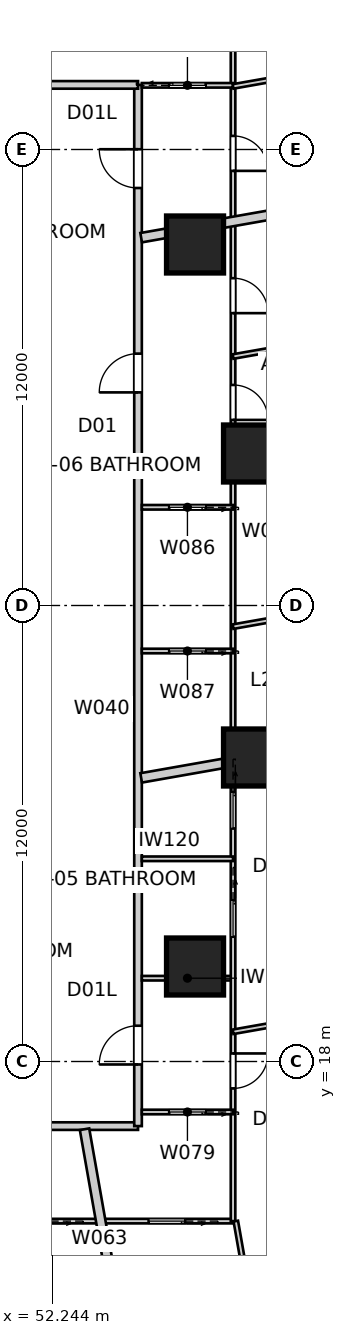
"""IFC4 building model, lengths in metres.
Left out: names, types, materials, properties, quantities, classifications, styles, units other than length and angle.
Written with IfcOpenShell. Run it as: python <this file> out.ifc"""

import sys

from ifc_helpers import new_model, si_unit, direction, frame, frame_2d, origin, origin_2d, place, context, subcontext, project, spatial, rectangle, extrude, element, fill, save


model = new_model("IFC4")
c1 = context("Model", 3, precision=1e-05, world=origin(), true_north=direction((0.0, 1.0)))
c2 = subcontext(c1, "Body", "Model", "MODEL_VIEW")
j1 = project(units=[si_unit("LENGTHUNIT", "METRE"), si_unit("PLANEANGLEUNIT", "RADIAN")], contexts=[c1])
p1 = place(None, origin())
s1 = spatial("IfcSite", under=j1, at=p1, CompositionType="ELEMENT")
p2 = place(p1, origin())
s2 = spatial("IfcBuilding", under=s1, at=p2, CompositionType="ELEMENT")
p3 = place(p2, frame((0.0, 0.0, 93.0)))
s3 = spatial("IfcBuildingStorey", under=s2, at=p3, CompositionType="ELEMENT", Elevation=93.0)
for number, where, z_axis, x_axis in (
    (1, (57.5, 26.0, 0.0), (0.0, 0.0, 1.0), (1.0, 0.0, 0.0)),
    (2, (57.5, 34.0, 0.0), (0.0, 0.0, 1.0), (1.0, 0.0, 0.0)),
    (3, (56.0, 39.5, 0.0), (0.0, 0.0, 1.0), (1.0, 0.0, 0.0)),
    (4, (56.0, 20.5, 0.0), (0.0, 0.0, 1.0), (1.0, 0.0, 0.0)),
):
    element("IfcColumn", number, at=place(p3, frame(where, z_axis=z_axis, x_axis=x_axis)), inside=s3, PredefinedType="COLUMN", context=c2, shape_type="SweptSolid", body=[
        extrude(rectangle(XDim=1.5, YDim=1.5, at=origin_2d()), origin(), (0.0, 0.0, 1.0), 3.4),
    ])
p4 = place(p3, frame((25.5, 16.3, 0.0), z_axis=(0.0, 0.0, 1.0), x_axis=(1.0, 0.0, 0.0)))
e5 = element("IfcWall", 5, at=p4, inside=s3, PredefinedType="PARTITIONING", context=c2, shape_type="SweptSolid", body=[
    extrude(rectangle(XDim=29.0, YDim=0.2, at=frame_2d((14.5, 0.0))), origin(), (0.0, 0.0, 1.0), 3.25),
])
p5 = place(p4, frame((20.896, 0.0, 0.0)))
e6 = element("IfcOpeningElement", 6, at=p5, cuts=e5, PredefinedType="OPENING", context=c2, shape_type="SweptSolid", body=[
    extrude(rectangle(XDim=1.02, YDim=2.34, at=frame_2d((0.51, 1.17))), frame((0.0, 0.11, 0.0), z_axis=(0.0, -1.0, 0.0), x_axis=(1.0, 0.0, 0.0)), (0.0, 0.0, 1.0), 0.22),
])
p6 = place(p4, frame((14.257, 0.0, 0.0)))
e7 = element("IfcOpeningElement", 7, at=p6, cuts=e5, PredefinedType="OPENING", context=c2, shape_type="SweptSolid", body=[
    extrude(rectangle(XDim=1.02, YDim=2.34, at=frame_2d((0.51, 1.17))), frame((0.0, 0.11, 0.0), z_axis=(0.0, -1.0, 0.0), x_axis=(1.0, 0.0, 0.0)), (0.0, 0.0, 1.0), 0.22),
])
p7 = place(p4, frame((3.857, 0.0, 0.0)))
e8 = element("IfcOpeningElement", 8, at=p7, cuts=e5, PredefinedType="OPENING", context=c2, shape_type="SweptSolid", body=[
    extrude(rectangle(XDim=1.02, YDim=2.34, at=frame_2d((0.51, 1.17))), frame((0.0, 0.11, 0.0), z_axis=(0.0, -1.0, 0.0), x_axis=(1.0, 0.0, 0.0)), (0.0, 0.0, 1.0), 0.22),
])
p8 = place(p3, frame((54.5, 16.3, 0.0), z_axis=(0.0, 0.0, 1.0), x_axis=(0.0, 1.0, 0.0)))
e9 = element("IfcWall", 9, at=p8, inside=s3, PredefinedType="PARTITIONING", context=c2, shape_type="SweptSolid", body=[
    extrude(rectangle(XDim=27.4, YDim=0.2, at=frame_2d((13.7, 0.0))), origin(), (0.0, 0.0, 1.0), 3.25),
])
p9 = place(p8, frame((19.308, 0.0, 0.0)))
e10 = element("IfcOpeningElement", 10, at=p9, cuts=e9, PredefinedType="OPENING", context=c2, shape_type="SweptSolid", body=[
    extrude(rectangle(XDim=1.02, YDim=2.34, at=frame_2d((0.51, 1.17))), frame((0.0, 0.11, 0.0), z_axis=(0.0, -1.0, 0.0), x_axis=(1.0, 0.0, 0.0)), (0.0, 0.0, 1.0), 0.22),
])
p10 = place(p8, frame((24.687, 0.0, 0.0)))
e11 = element("IfcOpeningElement", 11, at=p10, cuts=e9, PredefinedType="OPENING", context=c2, shape_type="SweptSolid", body=[
    extrude(rectangle(XDim=1.02, YDim=2.1, at=frame_2d((0.51, 1.05))), frame((0.0, 0.11, 0.0), z_axis=(0.0, -1.0, 0.0), x_axis=(1.0, 0.0, 0.0)), (0.0, 0.0, 1.0), 0.22),
])
p11 = place(p8, frame((1.622, 0.0, 0.0)))
e12 = element("IfcOpeningElement", 12, at=p11, cuts=e9, PredefinedType="OPENING", context=c2, shape_type="SweptSolid", body=[
    extrude(rectangle(XDim=1.02, YDim=2.1, at=frame_2d((0.51, 1.05))), frame((0.0, 0.11, 0.0), z_axis=(0.0, -1.0, 0.0), x_axis=(1.0, 0.0, 0.0)), (0.0, 0.0, 1.0), 0.22),
])
p12 = place(p3, frame((54.5, 43.7, 0.0), z_axis=(0.0, 0.0, 1.0), x_axis=(-1.0, 0.0, 0.0)))
e13 = element("IfcWall", 13, at=p12, inside=s3, PredefinedType="PARTITIONING", context=c2, shape_type="SweptSolid", body=[
    extrude(rectangle(XDim=29.0, YDim=0.2, at=frame_2d((14.5, 0.0))), origin(), (0.0, 0.0, 1.0), 3.25),
])
p13 = place(p12, frame((11.951, 0.0, 0.0)))
e14 = element("IfcOpeningElement", 14, at=p13, cuts=e13, PredefinedType="OPENING", context=c2, shape_type="SweptSolid", body=[
    extrude(rectangle(XDim=1.02, YDim=2.34, at=frame_2d((0.51, 1.17))), frame((0.0, 0.11, 0.0), z_axis=(0.0, -1.0, 0.0), x_axis=(1.0, 0.0, 0.0)), (0.0, 0.0, 1.0), 0.22),
])
p14 = place(p12, frame((4.795, 0.0, 0.0)))
e15 = element("IfcOpeningElement", 15, at=p14, cuts=e13, PredefinedType="OPENING", context=c2, shape_type="SweptSolid", body=[
    extrude(rectangle(XDim=1.02, YDim=2.34, at=frame_2d((0.51, 1.17))), frame((0.0, 0.11, 0.0), z_axis=(0.0, -1.0, 0.0), x_axis=(1.0, 0.0, 0.0)), (0.0, 0.0, 1.0), 0.22),
])
p15 = place(p3, frame((63.405, 41.235, 0.0), z_axis=(0.0, 0.0, 1.0), x_axis=(-0.984806596137, -0.173654738504, 0.0)))
e16 = element("IfcWall", 16, at=p15, inside=s3, PredefinedType="PARTITIONING", context=c2, shape_type="SweptSolid", body=[
    extrude(rectangle(XDim=8.958, YDim=0.25, at=frame_2d((4.479, 0.0))), origin(), (0.0, 0.0, 1.0), 3.25),
])
p16 = place(p3, frame((65.836, 27.448, 0.0), z_axis=(0.0, 0.0, 1.0), x_axis=(-0.98481000304, -0.173635416642, 0.0)))
e17 = element("IfcWall", 17, at=p16, inside=s3, PredefinedType="PARTITIONING", context=c2, shape_type="SweptSolid", body=[
    extrude(rectangle(XDim=11.427, YDim=0.25, at=frame_2d((5.713, 0.0))), origin(), (0.0, 0.0, 1.0), 3.25),
])
p17 = place(p3, frame((54.682, 7.203, 0.0), z_axis=(0.0, 0.0, 1.0), x_axis=(-0.173630137029, 0.984810933893, 0.0)))
e18 = element("IfcWall", 18, at=p17, inside=s3, PredefinedType="PARTITIONING", context=c2, shape_type="SweptSolid", body=[
    extrude(rectangle(XDim=9.154, YDim=0.25, at=frame_2d((4.577, 0.0))), origin(), (0.0, 0.0, 1.0), 3.25),
])
p18 = place(p3, frame((57.0, 13.8, 0.0), z_axis=(0.0, 0.0, 1.0), x_axis=(-1.0, 0.0, 0.0)))
e19 = element("IfcWall", 19, at=p18, inside=s3, PredefinedType="PARTITIONING", context=c2, shape_type="SweptSolid", body=[
    extrude(rectangle(XDim=34.0, YDim=0.12, at=frame_2d((17.0, 0.0))), origin(), (0.0, 0.0, 1.0), 2.55),
])
p19 = place(p18, frame((8.768, 0.0, 0.0)))
e20 = element("IfcOpeningElement", 20, at=p19, cuts=e19, PredefinedType="OPENING", context=c2, shape_type="SweptSolid", body=[
    extrude(rectangle(XDim=0.92, YDim=2.34, at=frame_2d((0.46, 1.17))), frame((0.0, 0.07, 0.0), z_axis=(0.0, -1.0, 0.0), x_axis=(1.0, 0.0, 0.0)), (0.0, 0.0, 1.0), 0.14),
])
p20 = place(p18, frame((10.995, 0.0, 0.0)))
e21 = element("IfcOpeningElement", 21, at=p20, cuts=e19, PredefinedType="OPENING", context=c2, shape_type="SweptSolid", body=[
    extrude(rectangle(XDim=0.92, YDim=2.34, at=frame_2d((0.46, 1.17))), frame((0.0, 0.07, 0.0), z_axis=(0.0, -1.0, 0.0), x_axis=(1.0, 0.0, 0.0)), (0.0, 0.0, 1.0), 0.14),
])
p21 = place(p18, frame((15.486, 0.0, 0.0)))
e22 = element("IfcOpeningElement", 22, at=p21, cuts=e19, PredefinedType="OPENING", context=c2, shape_type="SweptSolid", body=[
    extrude(rectangle(XDim=0.92, YDim=2.34, at=frame_2d((0.46, 1.17))), frame((0.0, 0.07, 0.0), z_axis=(0.0, -1.0, 0.0), x_axis=(1.0, 0.0, 0.0)), (0.0, 0.0, 1.0), 0.14),
])
p22 = place(p18, frame((4.804, 0.0, 0.0)))
e23 = element("IfcOpeningElement", 23, at=p22, cuts=e19, PredefinedType="OPENING", context=c2, shape_type="SweptSolid", body=[
    extrude(rectangle(XDim=0.96, YDim=2.1, at=frame_2d((0.48, 1.05))), frame((0.0, 0.07, 0.0), z_axis=(0.0, -1.0, 0.0), x_axis=(1.0, 0.0, 0.0)), (0.0, 0.0, 1.0), 0.14),
])
p23 = place(p18, frame((19.155, 0.0, 0.0)))
e24 = element("IfcOpeningElement", 24, at=p23, cuts=e19, PredefinedType="OPENING", context=c2, shape_type="SweptSolid", body=[
    extrude(rectangle(XDim=0.96, YDim=2.1, at=frame_2d((0.48, 1.05))), frame((0.0, 0.07, 0.0), z_axis=(0.0, -1.0, 0.0), x_axis=(1.0, 0.0, 0.0)), (0.0, 0.0, 1.0), 0.14),
])
p24 = place(p18, frame((31.473, 0.0, 0.0)))
e25 = element("IfcOpeningElement", 25, at=p24, cuts=e19, PredefinedType="OPENING", context=c2, shape_type="SweptSolid", body=[
    extrude(rectangle(XDim=0.96, YDim=2.1, at=frame_2d((0.48, 1.05))), frame((0.0, 0.07, 0.0), z_axis=(0.0, -1.0, 0.0), x_axis=(1.0, 0.0, 0.0)), (0.0, 0.0, 1.0), 0.14),
])
p25 = place(p18, frame((1.261, 0.0, 0.0)))
e26 = element("IfcOpeningElement", 26, at=p25, cuts=e19, PredefinedType="OPENING", context=c2, shape_type="SweptSolid", body=[
    extrude(rectangle(XDim=0.96, YDim=2.1, at=frame_2d((0.48, 1.05))), frame((0.0, 0.07, 0.0), z_axis=(0.0, -1.0, 0.0), x_axis=(1.0, 0.0, 0.0)), (0.0, 0.0, 1.0), 0.14),
])
p26 = place(p18, frame((22.627, 0.0, 0.0)))
e27 = element("IfcOpeningElement", 27, at=p26, cuts=e19, PredefinedType="OPENING", context=c2, shape_type="SweptSolid", body=[
    extrude(rectangle(XDim=0.96, YDim=2.1, at=frame_2d((0.48, 1.05))), frame((0.0, 0.07, 0.0), z_axis=(0.0, -1.0, 0.0), x_axis=(1.0, 0.0, 0.0)), (0.0, 0.0, 1.0), 0.14),
])
p27 = place(p3, frame((54.6, 20.192, 0.0), z_axis=(0.0, 0.0, 1.0), x_axis=(1.0, 0.0, 0.0)))
e28 = element("IfcWall", 28, at=p27, inside=s3, PredefinedType="PARTITIONING", context=c2, shape_type="SweptSolid", body=[
    extrude(rectangle(XDim=2.4, YDim=0.12, at=frame_2d((1.2, 0.0))), origin(), (0.0, 0.0, 1.0), 3.25),
])
p28 = place(p3, frame((57.0, 46.2, 0.0), z_axis=(0.0, 0.0, 1.0), x_axis=(0.0, -1.0, 0.0)))
e29 = element("IfcWall", 29, at=p28, inside=s3, PredefinedType="PARTITIONING", context=c2, shape_type="SweptSolid", body=[
    extrude(rectangle(XDim=32.4, YDim=0.12, at=frame_2d((16.2, 0.0))), origin(), (0.0, 0.0, 1.0), 2.55),
])
p29 = place(p28, frame((10.396, 0.0, 0.0)))
e30 = element("IfcOpeningElement", 30, at=p29, cuts=e29, PredefinedType="OPENING", context=c2, shape_type="SweptSolid", body=[
    extrude(rectangle(XDim=0.92, YDim=2.34, at=frame_2d((0.46, 1.17))), frame((0.0, 0.07, 0.0), z_axis=(0.0, -1.0, 0.0), x_axis=(1.0, 0.0, 0.0)), (0.0, 0.0, 1.0), 0.14),
])
p30 = place(p28, frame((7.587, 0.0, 0.0)))
e31 = element("IfcOpeningElement", 31, at=p30, cuts=e29, PredefinedType="OPENING", context=c2, shape_type="SweptSolid", body=[
    extrude(rectangle(XDim=0.92, YDim=2.34, at=frame_2d((0.46, 1.17))), frame((0.0, 0.07, 0.0), z_axis=(0.0, -1.0, 0.0), x_axis=(1.0, 0.0, 0.0)), (0.0, 0.0, 1.0), 0.14),
])
p31 = place(p28, frame((3.843, 0.0, 0.0)))
e32 = element("IfcOpeningElement", 32, at=p31, cuts=e29, PredefinedType="OPENING", context=c2, shape_type="SweptSolid", body=[
    extrude(rectangle(XDim=0.92, YDim=2.34, at=frame_2d((0.46, 1.17))), frame((0.0, 0.07, 0.0), z_axis=(0.0, -1.0, 0.0), x_axis=(1.0, 0.0, 0.0)), (0.0, 0.0, 1.0), 0.14),
])
p32 = place(p28, frame((27.988, 0.0, 0.0)))
e33 = element("IfcOpeningElement", 33, at=p32, cuts=e29, PredefinedType="OPENING", context=c2, shape_type="SweptSolid", body=[
    extrude(rectangle(XDim=0.92, YDim=2.34, at=frame_2d((0.46, 1.17))), frame((0.0, 0.07, 0.0), z_axis=(0.0, -1.0, 0.0), x_axis=(1.0, 0.0, 0.0)), (0.0, 0.0, 1.0), 0.14),
])
p33 = place(p28, frame((23.957, 0.0, 0.0)))
e34 = element("IfcOpeningElement", 34, at=p33, cuts=e29, PredefinedType="OPENING", context=c2, shape_type="SweptSolid", body=[
    extrude(rectangle(XDim=0.96, YDim=2.1, at=frame_2d((0.48, 1.05))), frame((0.0, 0.07, 0.0), z_axis=(0.0, -1.0, 0.0), x_axis=(1.0, 0.0, 0.0)), (0.0, 0.0, 1.0), 0.14),
])
p34 = place(p28, frame((21.108, 0.0, 0.0)))
e35 = element("IfcOpeningElement", 35, at=p34, cuts=e29, PredefinedType="OPENING", context=c2, shape_type="SweptSolid", body=[
    extrude(rectangle(XDim=0.96, YDim=2.1, at=frame_2d((0.48, 1.05))), frame((0.0, 0.07, 0.0), z_axis=(0.0, -1.0, 0.0), x_axis=(1.0, 0.0, 0.0)), (0.0, 0.0, 1.0), 0.14),
])
p35 = place(p3, frame((57.0, 16.671, 0.0), z_axis=(0.0, 0.0, 1.0), x_axis=(-1.0, 0.0, 0.0)))
e36 = element("IfcWall", 36, at=p35, inside=s3, PredefinedType="PARTITIONING", context=c2, shape_type="SweptSolid", body=[
    extrude(rectangle(XDim=2.4, YDim=0.12, at=frame_2d((1.2, 0.0))), origin(), (0.0, 0.0, 1.0), 3.25),
])
p36 = place(p35, frame((0.72, 0.0, 0.0)))
e37 = element("IfcOpeningElement", 37, at=p36, cuts=e36, PredefinedType="OPENING", context=c2, shape_type="SweptSolid", body=[
    extrude(rectangle(XDim=0.96, YDim=2.1, at=frame_2d((0.48, 1.05))), frame((0.0, 0.07, 0.0), z_axis=(0.0, -1.0, 0.0), x_axis=(1.0, 0.0, 0.0)), (0.0, 0.0, 1.0), 0.14),
])
p37 = place(p3, frame((54.6, 23.335, 0.0), z_axis=(0.0, 0.0, 1.0), x_axis=(1.0, 0.0, 0.0)))
e38 = element("IfcWall", 38, at=p37, inside=s3, PredefinedType="PARTITIONING", context=c2, shape_type="SweptSolid", body=[
    extrude(rectangle(XDim=2.4, YDim=0.12, at=frame_2d((1.2, 0.0))), origin(), (0.0, 0.0, 1.0), 3.25),
])
p38 = place(p3, frame((67.012, 20.547, 0.0), z_axis=(0.0, 0.0, 1.0), x_axis=(-0.984807724889, -0.173648337162, 0.0)))
e39 = element("IfcWall", 39, at=p38, inside=s3, PredefinedType="PARTITIONING", context=c2, shape_type="SweptSolid", body=[
    extrude(rectangle(XDim=10.167, YDim=0.12, at=frame_2d((5.083, 0.0))), origin(), (0.0, 0.0, 1.0), 2.638),
])
p39 = place(p38, frame((8.328, 0.0, 0.0)))
e40 = element("IfcOpeningElement", 40, at=p39, cuts=e39, PredefinedType="OPENING", context=c2, shape_type="SweptSolid", body=[
    extrude(rectangle(XDim=0.92, YDim=2.34, at=frame_2d((0.46, 1.17))), frame((0.0, 0.07, 0.0), z_axis=(0.0, -1.0, 0.0), x_axis=(1.0, 0.0, 0.0)), (0.0, 0.0, 1.0), 0.14),
])
p40 = place(p3, frame((58.122, 7.85, 0.0), z_axis=(0.0, 0.0, 1.0), x_axis=(-0.173644708382, 0.984808364734, 0.0)))
e41 = element("IfcWall", 41, at=p40, inside=s3, PredefinedType="PARTITIONING", context=c2, shape_type="SweptSolid", body=[
    extrude(rectangle(XDim=6.042, YDim=0.12, at=frame_2d((3.021, 0.0))), origin(), (0.0, 0.0, 1.0), 2.638),
])
p41 = place(p3, frame((57.0, 32.585, 0.0), z_axis=(0.0, 0.0, 1.0), x_axis=(-1.0, 0.0, 0.0)))
e42 = element("IfcWall", 42, at=p41, inside=s3, PredefinedType="PARTITIONING", context=c2, shape_type="SweptSolid", body=[
    extrude(rectangle(XDim=2.4, YDim=0.12, at=frame_2d((1.2, 0.0))), origin(), (0.0, 0.0, 1.0), 3.25),
])
p42 = place(p41, frame((0.72, 0.0, 0.0)))
e43 = element("IfcOpeningElement", 43, at=p42, cuts=e42, PredefinedType="OPENING", context=c2, shape_type="SweptSolid", body=[
    extrude(rectangle(XDim=0.96, YDim=2.1, at=frame_2d((0.48, 1.05))), frame((0.0, 0.07, 0.0), z_axis=(0.0, -1.0, 0.0), x_axis=(1.0, 0.0, 0.0)), (0.0, 0.0, 1.0), 0.14),
])
p43 = place(p3, frame((57.0, 28.802, 0.0), z_axis=(0.0, 0.0, 1.0), x_axis=(-1.0, 0.0, 0.0)))
e44 = element("IfcWall", 44, at=p43, inside=s3, PredefinedType="PARTITIONING", context=c2, shape_type="SweptSolid", body=[
    extrude(rectangle(XDim=2.4, YDim=0.12, at=frame_2d((1.2, 0.0))), origin(), (0.0, 0.0, 1.0), 3.25),
])
p44 = place(p43, frame((0.72, 0.0, 0.0)))
e45 = element("IfcOpeningElement", 45, at=p44, cuts=e44, PredefinedType="OPENING", context=c2, shape_type="SweptSolid", body=[
    extrude(rectangle(XDim=0.96, YDim=2.1, at=frame_2d((0.48, 1.05))), frame((0.0, 0.07, 0.0), z_axis=(0.0, -1.0, 0.0), x_axis=(1.0, 0.0, 0.0)), (0.0, 0.0, 1.0), 0.14),
])
p45 = place(p3, frame((65.188, 30.887, 0.0), z_axis=(0.0, 0.0, 1.0), x_axis=(-0.984807787824, -0.173647980238, 0.0)))
e46 = element("IfcWall", 46, at=p45, inside=s3, PredefinedType="PARTITIONING", context=c2, shape_type="SweptSolid", body=[
    extrude(rectangle(XDim=8.315, YDim=0.12, at=frame_2d((4.157, 0.0))), origin(), (0.0, 0.0, 1.0), 3.25),
])
p46 = place(p45, frame((3.677, 0.0, 0.0)))
e47 = element("IfcOpeningElement", 47, at=p46, cuts=e46, PredefinedType="OPENING", context=c2, shape_type="SweptSolid", body=[
    extrude(rectangle(XDim=0.92, YDim=2.34, at=frame_2d((0.46, 1.17))), frame((0.0, 0.07, 0.0), z_axis=(0.0, -1.0, 0.0), x_axis=(1.0, 0.0, 0.0)), (0.0, 0.0, 1.0), 0.14),
])
p47 = place(p3, frame((57.0, 36.552, 0.0), z_axis=(0.0, 0.0, 1.0), x_axis=(0.984809234282, 0.173639776761, 0.0)))
e48 = element("IfcWall", 48, at=p47, inside=s3, PredefinedType="PARTITIONING", context=c2, shape_type="SweptSolid", body=[
    extrude(rectangle(XDim=7.081, YDim=0.12, at=frame_2d((3.541, 0.0))), origin(), (0.0, 0.0, 1.0), 3.25),
])
p48 = place(p3, frame((54.6, 43.689, 0.0), z_axis=(0.0, 0.0, 1.0), x_axis=(1.0, 0.0, 0.0)))
e49 = element("IfcWall", 49, at=p48, inside=s3, PredefinedType="PARTITIONING", context=c2, shape_type="SweptSolid", body=[
    extrude(rectangle(XDim=2.4, YDim=0.12, at=frame_2d((1.2, 0.0))), origin(), (0.0, 0.0, 1.0), 3.25),
])
p49 = place(p48, frame((0.72, 0.0, 0.0)))
e50 = element("IfcOpeningElement", 50, at=p49, cuts=e49, PredefinedType="OPENING", context=c2, shape_type="SweptSolid", body=[
    extrude(rectangle(XDim=0.96, YDim=2.1, at=frame_2d((0.48, 1.05))), frame((0.0, 0.07, 0.0), z_axis=(0.0, -1.0, 0.0), x_axis=(1.0, 0.0, 0.0)), (0.0, 0.0, 1.0), 0.14),
])
p50 = place(p3, frame((62.758, 44.675, 0.0), z_axis=(0.0, 0.0, 1.0), x_axis=(-0.984810032319, -0.173635250578, 0.0)))
e51 = element("IfcWall", 51, at=p50, inside=s3, PredefinedType="PARTITIONING", context=c2, shape_type="SweptSolid", body=[
    extrude(rectangle(XDim=5.846, YDim=0.12, at=frame_2d((2.923, 0.0))), origin(), (0.0, 0.0, 1.0), 3.25),
])
p51 = place(p50, frame((2.443, 0.0, 0.0)))
e52 = element("IfcOpeningElement", 52, at=p51, cuts=e51, PredefinedType="OPENING", context=c2, shape_type="SweptSolid", body=[
    extrude(rectangle(XDim=0.92, YDim=2.34, at=frame_2d((0.46, 1.17))), frame((0.0, 0.07, 0.0), z_axis=(0.0, -1.0, 0.0), x_axis=(1.0, 0.0, 0.0)), (0.0, 0.0, 1.0), 0.14),
])
p52 = place(p9, origin())
e53 = element("IfcDoor", 53, at=p52, inside=s3, OperationType="SINGLE_SWING_LEFT", PredefinedType="DOOR", context=c2, shape_type="SweptSolid", body=[
    extrude(rectangle(XDim=1.02, YDim=2.34, at=frame_2d((0.51, 1.17))), frame((0.0, 0.025, 0.0), z_axis=(0.0, -1.0, 0.0), x_axis=(1.0, 0.0, 0.0)), (0.0, 0.0, 1.0), 0.05),
])
fill(e10, e53)
p53 = place(p10, origin())
e54 = element("IfcDoor", 54, at=p53, inside=s3, OperationType="SINGLE_SWING_RIGHT", PredefinedType="DOOR", context=c2, shape_type="SweptSolid", body=[
    extrude(rectangle(XDim=1.02, YDim=2.1, at=frame_2d((0.51, 1.05))), frame((0.0, 0.025, 0.0), z_axis=(0.0, -1.0, 0.0), x_axis=(1.0, 0.0, 0.0)), (0.0, 0.0, 1.0), 0.05),
])
fill(e11, e54)
p54 = place(p11, origin())
e55 = element("IfcDoor", 55, at=p54, inside=s3, OperationType="SINGLE_SWING_LEFT", PredefinedType="DOOR", context=c2, shape_type="SweptSolid", body=[
    extrude(rectangle(XDim=1.02, YDim=2.1, at=frame_2d((0.51, 1.05))), frame((0.0, 0.025, 0.0), z_axis=(0.0, -1.0, 0.0), x_axis=(1.0, 0.0, 0.0)), (0.0, 0.0, 1.0), 0.05),
])
fill(e12, e55)
p55 = place(p29, origin())
e56 = element("IfcDoor", 56, at=p55, inside=s3, OperationType="SINGLE_SWING_RIGHT", PredefinedType="DOOR", context=c2, shape_type="SweptSolid", body=[
    extrude(rectangle(XDim=0.92, YDim=2.34, at=frame_2d((0.46, 1.17))), frame((0.0, 0.025, 0.0), z_axis=(0.0, -1.0, 0.0), x_axis=(1.0, 0.0, 0.0)), (0.0, 0.0, 1.0), 0.05),
])
fill(e30, e56)
p56 = place(p30, origin())
e57 = element("IfcDoor", 57, at=p56, inside=s3, OperationType="SINGLE_SWING_RIGHT", PredefinedType="DOOR", context=c2, shape_type="SweptSolid", body=[
    extrude(rectangle(XDim=0.92, YDim=2.34, at=frame_2d((0.46, 1.17))), frame((0.0, 0.025, 0.0), z_axis=(0.0, -1.0, 0.0), x_axis=(1.0, 0.0, 0.0)), (0.0, 0.0, 1.0), 0.05),
])
fill(e31, e57)
p57 = place(p42, origin())
e58 = element("IfcDoor", 58, at=p57, inside=s3, OperationType="SLIDING_TO_LEFT", PredefinedType="DOOR", context=c2, shape_type="SweptSolid", body=[
    extrude(rectangle(XDim=0.96, YDim=2.1, at=frame_2d((0.48, 1.05))), frame((0.0, 0.025, 0.0), z_axis=(0.0, -1.0, 0.0), x_axis=(1.0, 0.0, 0.0)), (0.0, 0.0, 1.0), 0.05),
])
fill(e43, e58)
p58 = place(p31, origin())
e59 = element("IfcDoor", 59, at=p58, inside=s3, OperationType="SINGLE_SWING_RIGHT", PredefinedType="DOOR", context=c2, shape_type="SweptSolid", body=[
    extrude(rectangle(XDim=0.92, YDim=2.34, at=frame_2d((0.46, 1.17))), frame((0.0, 0.025, 0.0), z_axis=(0.0, -1.0, 0.0), x_axis=(1.0, 0.0, 0.0)), (0.0, 0.0, 1.0), 0.05),
])
fill(e32, e59)
p59 = place(p49, origin())
e60 = element("IfcDoor", 60, at=p59, inside=s3, OperationType="SLIDING_TO_LEFT", PredefinedType="DOOR", context=c2, shape_type="SweptSolid", body=[
    extrude(rectangle(XDim=0.96, YDim=2.1, at=frame_2d((0.48, 1.05))), frame((0.0, 0.025, 0.0), z_axis=(0.0, -1.0, 0.0), x_axis=(1.0, 0.0, 0.0)), (0.0, 0.0, 1.0), 0.05),
])
fill(e50, e60)
p60 = place(p36, origin())
e61 = element("IfcDoor", 61, at=p60, inside=s3, OperationType="SLIDING_TO_LEFT", PredefinedType="DOOR", context=c2, shape_type="SweptSolid", body=[
    extrude(rectangle(XDim=0.96, YDim=2.1, at=frame_2d((0.48, 1.05))), frame((0.0, 0.025, 0.0), z_axis=(0.0, -1.0, 0.0), x_axis=(1.0, 0.0, 0.0)), (0.0, 0.0, 1.0), 0.05),
])
fill(e37, e61)
p61 = place(p32, origin())
e62 = element("IfcDoor", 62, at=p61, inside=s3, OperationType="SINGLE_SWING_LEFT", PredefinedType="DOOR", context=c2, shape_type="SweptSolid", body=[
    extrude(rectangle(XDim=0.92, YDim=2.34, at=frame_2d((0.46, 1.17))), frame((0.0, 0.025, 0.0), z_axis=(0.0, -1.0, 0.0), x_axis=(1.0, 0.0, 0.0)), (0.0, 0.0, 1.0), 0.05),
])
fill(e33, e62)
p62 = place(p44, origin())
e63 = element("IfcDoor", 63, at=p62, inside=s3, OperationType="SLIDING_TO_LEFT", PredefinedType="DOOR", context=c2, shape_type="SweptSolid", body=[
    extrude(rectangle(XDim=0.96, YDim=2.1, at=frame_2d((0.48, 1.05))), frame((0.0, 0.025, 0.0), z_axis=(0.0, -1.0, 0.0), x_axis=(1.0, 0.0, 0.0)), (0.0, 0.0, 1.0), 0.05),
])
fill(e45, e63)
p63 = place(p25, origin())
e64 = element("IfcDoor", 64, at=p63, inside=s3, OperationType="SLIDING_TO_LEFT", PredefinedType="DOOR", context=c2, shape_type="SweptSolid", body=[
    extrude(rectangle(XDim=0.96, YDim=2.1, at=frame_2d((0.48, 1.05))), frame((0.0, 0.025, 0.0), z_axis=(0.0, -1.0, 0.0), x_axis=(1.0, 0.0, 0.0)), (0.0, 0.0, 1.0), 0.05),
])
fill(e26, e64)
p64 = place(p33, origin())
e65 = element("IfcDoor", 65, at=p64, inside=s3, OperationType="SLIDING_TO_LEFT", PredefinedType="DOOR", context=c2, shape_type="SweptSolid", body=[
    extrude(rectangle(XDim=0.96, YDim=2.1, at=frame_2d((0.48, 1.05))), frame((0.0, 0.025, 0.0), z_axis=(0.0, -1.0, 0.0), x_axis=(1.0, 0.0, 0.0)), (0.0, 0.0, 1.0), 0.05),
])
fill(e34, e65)
p65 = place(p34, origin())
e66 = element("IfcDoor", 66, at=p65, inside=s3, OperationType="SLIDING_TO_LEFT", PredefinedType="DOOR", context=c2, shape_type="SweptSolid", body=[
    extrude(rectangle(XDim=0.96, YDim=2.1, at=frame_2d((0.48, 1.05))), frame((0.0, 0.025, 0.0), z_axis=(0.0, -1.0, 0.0), x_axis=(1.0, 0.0, 0.0)), (0.0, 0.0, 1.0), 0.05),
])
fill(e35, e66)
save(model, sys.argv[1])
